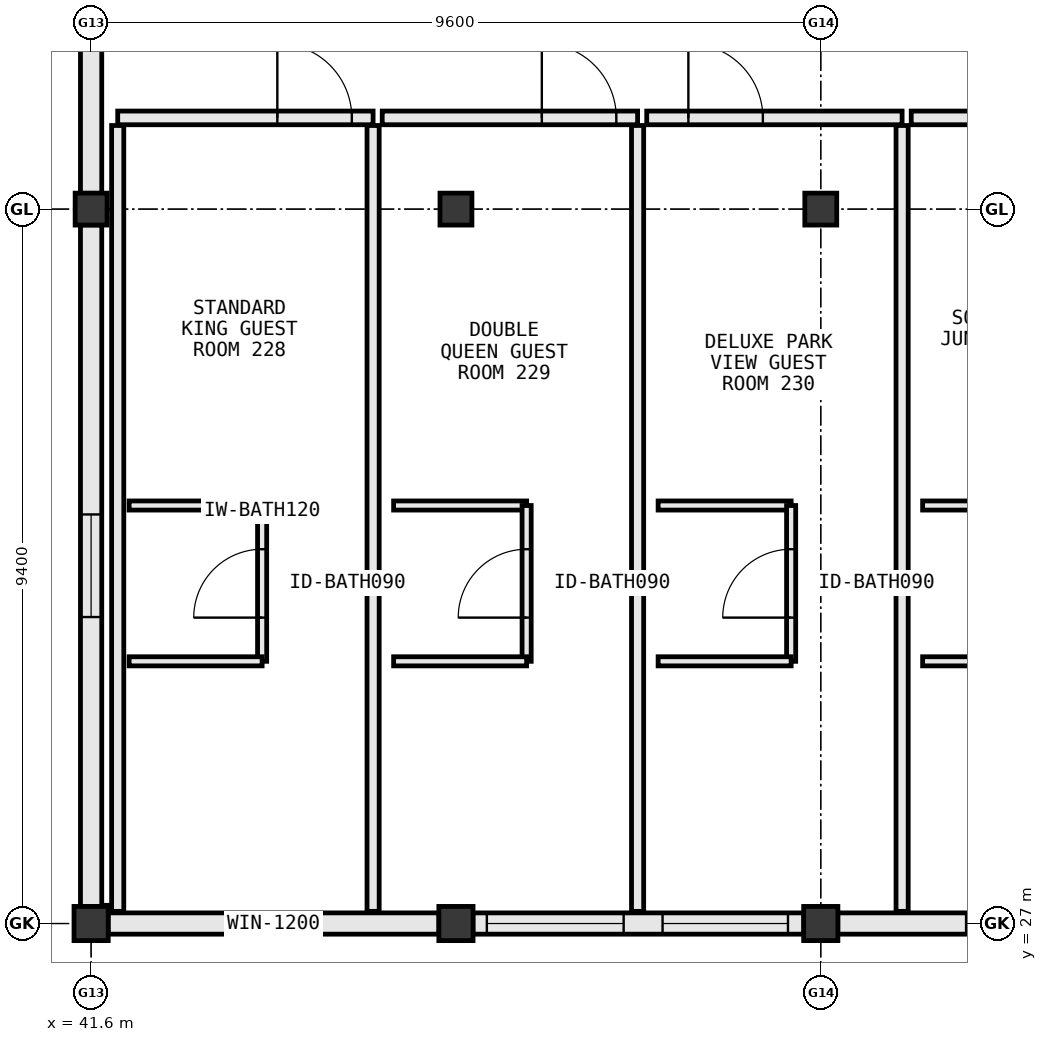
"""IFC4 building model, lengths in metres.
Left out: names, types, materials, properties, quantities, classifications, styles, units other than length and angle.
Written with IfcOpenShell. Run it as: python <this file> out.ifc"""

import sys

from ifc_helpers import new_model, si_unit, direction, frame, frame_2d, origin, origin_2d, place, context, subcontext, project, spatial, rectangle, extrude, element, fill, save


model = new_model("IFC4")
c1 = context("Model", 3, precision=1e-05, world=origin(), true_north=direction((0.0, 1.0)))
c2 = subcontext(c1, "Body", "Model", "MODEL_VIEW")
j1 = project(units=[si_unit("LENGTHUNIT", "METRE"), si_unit("PLANEANGLEUNIT", "RADIAN")], contexts=[c1])
p1 = place(None, origin())
s1 = spatial("IfcSite", under=j1, at=p1, CompositionType="ELEMENT")
p2 = place(p1, origin())
s2 = spatial("IfcBuilding", under=s1, at=p2, CompositionType="ELEMENT")
p3 = place(p2, frame((0.0, 0.0, 31.4)))
s3 = spatial("IfcBuildingStorey", under=s2, at=p3, CompositionType="ELEMENT", Elevation=31.4)
p4 = place(p3, frame((41.6, 27.0, 0.0), z_axis=(0.0, 0.0, 1.0), x_axis=(1.0, 0.0, 0.0)))
e1 = element("IfcColumn", 1, at=p4, inside=s3, PredefinedType="COLUMN", context=c2, shape_type="SweptSolid", body=[
    extrude(rectangle(XDim=0.45, YDim=0.45, at=origin_2d()), origin(), (0.0, 0.0, 1.0), 3.8),
])
p5 = place(p3, frame((41.6, 36.4, 0.0), z_axis=(0.0, 0.0, 1.0), x_axis=(1.0, 0.0, 0.0)))
e2 = element("IfcColumn", 2, at=p5, inside=s3, PredefinedType="COLUMN", context=c2, shape_type="SweptSolid", body=[
    extrude(rectangle(XDim=0.42, YDim=0.42, at=origin_2d()), origin(), (0.0, 0.0, 1.0), 3.8),
])
p6 = place(p3, frame((46.4, 27.0, 0.0), z_axis=(0.0, 0.0, 1.0), x_axis=(1.0, 0.0, 0.0)))
e3 = element("IfcColumn", 3, at=p6, inside=s3, PredefinedType="COLUMN", context=c2, shape_type="SweptSolid", body=[
    extrude(rectangle(XDim=0.45, YDim=0.45, at=origin_2d()), origin(), (0.0, 0.0, 1.0), 3.8),
])
p7 = place(p3, frame((46.4, 36.4, 0.0), z_axis=(0.0, 0.0, 1.0), x_axis=(1.0, 0.0, 0.0)))
e4 = element("IfcColumn", 4, at=p7, inside=s3, PredefinedType="COLUMN", context=c2, shape_type="SweptSolid", body=[
    extrude(rectangle(XDim=0.42, YDim=0.42, at=origin_2d()), origin(), (0.0, 0.0, 1.0), 3.8),
])
p8 = place(p3, frame((51.2, 27.0, 0.0), z_axis=(0.0, 0.0, 1.0), x_axis=(1.0, 0.0, 0.0)))
e5 = element("IfcColumn", 5, at=p8, inside=s3, PredefinedType="COLUMN", context=c2, shape_type="SweptSolid", body=[
    extrude(rectangle(XDim=0.45, YDim=0.45, at=origin_2d()), origin(), (0.0, 0.0, 1.0), 3.8),
])
p9 = place(p3, frame((51.2, 36.4, 0.0), z_axis=(0.0, 0.0, 1.0), x_axis=(1.0, 0.0, 0.0)))
e6 = element("IfcColumn", 6, at=p9, inside=s3, PredefinedType="COLUMN", context=c2, shape_type="SweptSolid", body=[
    extrude(rectangle(XDim=0.42, YDim=0.42, at=origin_2d()), origin(), (0.0, 0.0, 1.0), 3.8),
])
p10 = place(p3, frame((41.6, 46.992, 0.0), z_axis=(0.0, 0.0, 1.0), x_axis=(0.0, -1.0, 0.0)))
e7 = element("IfcWall", 7, at=p10, inside=s3, PredefinedType="STANDARD", context=c2, shape_type="SweptSolid", body=[
    extrude(rectangle(XDim=10.384, YDim=0.28, at=frame_2d((5.192, 0.0))), origin(), (0.0, 0.0, 1.0), 2.91),
])
p11 = place(p10, frame((1.921, 0.0, 0.85)))
e8 = element("IfcOpeningElement", 8, at=p11, cuts=e7, PredefinedType="OPENING", context=c2, shape_type="SweptSolid", body=[
    extrude(rectangle(XDim=1.35, YDim=1.65, at=frame_2d((0.675, 0.825))), frame((0.0, 0.152, 0.0), z_axis=(0.0, -1.0, 0.0), x_axis=(1.0, 0.0, 0.0)), (0.0, 0.0, 1.0), 0.304),
])
p12 = place(p10, frame((7.113, 0.0, 0.85)))
e9 = element("IfcOpeningElement", 9, at=p12, cuts=e7, PredefinedType="OPENING", context=c2, shape_type="SweptSolid", body=[
    extrude(rectangle(XDim=1.35, YDim=1.65, at=frame_2d((0.675, 0.825))), frame((0.0, 0.152, 0.0), z_axis=(0.0, -1.0, 0.0), x_axis=(1.0, 0.0, 0.0)), (0.0, 0.0, 1.0), 0.304),
])
p13 = place(p3, frame((41.6, 36.192, 0.0), z_axis=(0.0, 0.0, 1.0), x_axis=(0.0, -1.0, 0.0)))
e10 = element("IfcWall", 10, at=p13, inside=s3, PredefinedType="STANDARD", context=c2, shape_type="SweptSolid", body=[
    extrude(rectangle(XDim=8.969, YDim=0.28, at=frame_2d((4.484, 0.0))), origin(), (0.0, 0.0, 1.0), 2.93),
])
p14 = place(p13, frame((3.81, 0.0, 0.85)))
e11 = element("IfcOpeningElement", 11, at=p14, cuts=e10, PredefinedType="OPENING", context=c2, shape_type="SweptSolid", body=[
    extrude(rectangle(XDim=1.35, YDim=1.65, at=frame_2d((0.675, 0.825))), frame((0.0, 0.152, 0.0), z_axis=(0.0, -1.0, 0.0), x_axis=(1.0, 0.0, 0.0)), (0.0, 0.0, 1.0), 0.304),
])
p15 = place(p3, frame((41.823, 27.0, 0.0), z_axis=(0.0, 0.0, 1.0), x_axis=(1.0, 0.0, 0.0)))
e12 = element("IfcWall", 12, at=p15, inside=s3, PredefinedType="STANDARD", context=c2, shape_type="SweptSolid", body=[
    extrude(rectangle(XDim=4.354, YDim=0.28, at=frame_2d((2.177, 0.0))), origin(), (0.0, 0.0, 1.0), 3.01),
])
p16 = place(p15, frame((1.577, 0.0, 0.85)))
e13 = element("IfcOpeningElement", 13, at=p16, cuts=e12, PredefinedType="OPENING", context=c2, shape_type="SweptSolid", body=[
    extrude(rectangle(XDim=1.2, YDim=1.55, at=frame_2d((0.6, 0.775))), frame((0.0, 0.152, 0.0), z_axis=(0.0, -1.0, 0.0), x_axis=(1.0, 0.0, 0.0)), (0.0, 0.0, 1.0), 0.304),
])
p17 = place(p3, frame((46.623, 27.0, 0.0), z_axis=(0.0, 0.0, 1.0), x_axis=(1.0, 0.0, 0.0)))
e14 = element("IfcWall", 14, at=p17, inside=s3, PredefinedType="STANDARD", context=c2, shape_type="SweptSolid", body=[
    extrude(rectangle(XDim=4.354, YDim=0.28, at=frame_2d((2.177, 0.0))), origin(), (0.0, 0.0, 1.0), 3.01),
])
p18 = place(p17, frame((0.184, 0.0, 0.85)))
e15 = element("IfcOpeningElement", 15, at=p18, cuts=e14, PredefinedType="OPENING", context=c2, shape_type="SweptSolid", body=[
    extrude(rectangle(XDim=1.8, YDim=1.85, at=frame_2d((0.9, 0.925))), frame((0.0, 0.152, 0.0), z_axis=(0.0, -1.0, 0.0), x_axis=(1.0, 0.0, 0.0)), (0.0, 0.0, 1.0), 0.304),
])
p19 = place(p17, frame((2.496, 0.0, 0.85)))
e16 = element("IfcOpeningElement", 16, at=p19, cuts=e14, PredefinedType="OPENING", context=c2, shape_type="SweptSolid", body=[
    extrude(rectangle(XDim=1.65, YDim=1.8, at=frame_2d((0.825, 0.9))), frame((0.0, 0.152, 0.0), z_axis=(0.0, -1.0, 0.0), x_axis=(1.0, 0.0, 0.0)), (0.0, 0.0, 1.0), 0.304),
])
p20 = place(p3, frame((51.423, 27.0, 0.0), z_axis=(0.0, 0.0, 1.0), x_axis=(1.0, 0.0, 0.0)))
e17 = element("IfcWall", 17, at=p20, inside=s3, PredefinedType="STANDARD", context=c2, shape_type="SweptSolid", body=[
    extrude(rectangle(XDim=9.154, YDim=0.28, at=frame_2d((4.577, 0.0))), origin(), (0.0, 0.0, 1.0), 2.83),
])
p21 = place(p20, frame((1.688, 0.0, 0.85)))
e18 = element("IfcOpeningElement", 18, at=p21, cuts=e17, PredefinedType="OPENING", context=c2, shape_type="SweptSolid", body=[
    extrude(rectangle(XDim=1.2, YDim=1.55, at=frame_2d((0.6, 0.775))), frame((0.0, 0.152, 0.0), z_axis=(0.0, -1.0, 0.0), x_axis=(1.0, 0.0, 0.0)), (0.0, 0.0, 1.0), 0.304),
])
p22 = place(p20, frame((6.265, 0.0, 0.85)))
e19 = element("IfcOpeningElement", 19, at=p22, cuts=e17, PredefinedType="OPENING", context=c2, shape_type="SweptSolid", body=[
    extrude(rectangle(XDim=1.2, YDim=1.55, at=frame_2d((0.6, 0.775))), frame((0.0, 0.152, 0.0), z_axis=(0.0, -1.0, 0.0), x_axis=(1.0, 0.0, 0.0)), (0.0, 0.0, 1.0), 0.304),
])
p23 = place(p3, frame((45.31, 37.6, 0.0), z_axis=(0.0, 0.0, 1.0), x_axis=(-1.0, 0.0, 0.0)))
e20 = element("IfcWall", 20, at=p23, inside=s3, PredefinedType="PARTITIONING", context=c2, shape_type="SweptSolid", body=[
    extrude(rectangle(XDim=3.36, YDim=0.18, at=frame_2d((1.68, 0.0))), origin(), (0.0, 0.0, 1.0), 3.555),
])
p24 = place(p23, frame((0.28, 0.0, 0.0)))
e21 = element("IfcOpeningElement", 21, at=p24, cuts=e20, PredefinedType="OPENING", context=c2, shape_type="SweptSolid", body=[
    extrude(rectangle(XDim=0.98, YDim=2.18, at=frame_2d((0.49, 1.09))), frame((0.0, 0.102, 0.0), z_axis=(0.0, -1.0, 0.0), x_axis=(1.0, 0.0, 0.0)), (0.0, 0.0, 1.0), 0.204),
])
p25 = place(p3, frame((41.95, 27.16, 0.0), z_axis=(0.0, 0.0, 1.0), x_axis=(0.0, 1.0, 0.0)))
e22 = element("IfcWall", 22, at=p25, inside=s3, PredefinedType="PARTITIONING", context=c2, shape_type="SweptSolid", body=[
    extrude(rectangle(XDim=10.34, YDim=0.16, at=frame_2d((5.17, 0.0))), origin(), (0.0, 0.0, 1.0), 2.91),
])
p26 = place(p3, frame((45.31, 27.16, 0.0), z_axis=(0.0, 0.0, 1.0), x_axis=(0.0, 1.0, 0.0)))
e23 = element("IfcWall", 23, at=p26, inside=s3, PredefinedType="PARTITIONING", context=c2, shape_type="SweptSolid", body=[
    extrude(rectangle(XDim=10.34, YDim=0.16, at=frame_2d((5.17, 0.0))), origin(), (0.0, 0.0, 1.0), 3.555),
])
p27 = place(p3, frame((42.1, 32.5, 0.0), z_axis=(0.0, 0.0, 1.0), x_axis=(1.0, 0.0, 0.0)))
e24 = element("IfcWall", 24, at=p27, inside=s3, PredefinedType="PARTITIONING", context=c2, shape_type="SweptSolid", body=[
    extrude(rectangle(XDim=1.75, YDim=0.12, at=frame_2d((0.875, 0.0))), origin(), (0.0, 0.0, 1.0), 3.555),
])
p28 = place(p3, frame((43.85, 30.45, 0.0), z_axis=(0.0, 0.0, 1.0), x_axis=(0.0, 1.0, 0.0)))
e25 = element("IfcWall", 25, at=p28, inside=s3, PredefinedType="PARTITIONING", context=c2, shape_type="SweptSolid", body=[
    extrude(rectangle(XDim=2.05, YDim=0.12, at=frame_2d((1.025, 0.0))), origin(), (0.0, 0.0, 1.0), 3.1),
])
p29 = place(p28, frame((0.575, 0.0, 0.0)))
e26 = element("IfcOpeningElement", 26, at=p29, cuts=e25, PredefinedType="OPENING", context=c2, shape_type="SweptSolid", body=[
    extrude(rectangle(XDim=0.9, YDim=2.15, at=frame_2d((0.45, 1.075))), frame((0.0, 0.072, 0.0), z_axis=(0.0, -1.0, 0.0), x_axis=(1.0, 0.0, 0.0)), (0.0, 0.0, 1.0), 0.144),
])
p30 = place(p3, frame((42.1, 30.45, 0.0), z_axis=(0.0, 0.0, 1.0), x_axis=(1.0, 0.0, 0.0)))
e27 = element("IfcWall", 27, at=p30, inside=s3, PredefinedType="PARTITIONING", context=c2, shape_type="SweptSolid", body=[
    extrude(rectangle(XDim=1.75, YDim=0.12, at=frame_2d((0.875, 0.0))), origin(), (0.0, 0.0, 1.0), 3.555),
])
p31 = place(p3, frame((48.79, 37.6, 0.0), z_axis=(0.0, 0.0, 1.0), x_axis=(-1.0, 0.0, 0.0)))
e28 = element("IfcWall", 28, at=p31, inside=s3, PredefinedType="PARTITIONING", context=c2, shape_type="SweptSolid", body=[
    extrude(rectangle(XDim=3.36, YDim=0.18, at=frame_2d((1.68, 0.0))), origin(), (0.0, 0.0, 1.0), 3.555),
])
p32 = place(p31, frame((0.28, 0.0, 0.0)))
e29 = element("IfcOpeningElement", 29, at=p32, cuts=e28, PredefinedType="OPENING", context=c2, shape_type="SweptSolid", body=[
    extrude(rectangle(XDim=0.98, YDim=2.18, at=frame_2d((0.49, 1.09))), frame((0.0, 0.102, 0.0), z_axis=(0.0, -1.0, 0.0), x_axis=(1.0, 0.0, 0.0)), (0.0, 0.0, 1.0), 0.204),
])
p33 = place(p3, frame((48.79, 27.16, 0.0), z_axis=(0.0, 0.0, 1.0), x_axis=(0.0, 1.0, 0.0)))
e30 = element("IfcWall", 30, at=p33, inside=s3, PredefinedType="PARTITIONING", context=c2, shape_type="SweptSolid", body=[
    extrude(rectangle(XDim=10.34, YDim=0.16, at=frame_2d((5.17, 0.0))), origin(), (0.0, 0.0, 1.0), 3.1),
])
p34 = place(p3, frame((45.58, 32.5, 0.0), z_axis=(0.0, 0.0, 1.0), x_axis=(1.0, 0.0, 0.0)))
e31 = element("IfcWall", 31, at=p34, inside=s3, PredefinedType="PARTITIONING", context=c2, shape_type="SweptSolid", body=[
    extrude(rectangle(XDim=1.75, YDim=0.12, at=frame_2d((0.875, 0.0))), origin(), (0.0, 0.0, 1.0), 3.555),
])
p35 = place(p3, frame((47.33, 30.45, 0.0), z_axis=(0.0, 0.0, 1.0), x_axis=(0.0, 1.0, 0.0)))
e32 = element("IfcWall", 32, at=p35, inside=s3, PredefinedType="PARTITIONING", context=c2, shape_type="SweptSolid", body=[
    extrude(rectangle(XDim=2.05, YDim=0.12, at=frame_2d((1.025, 0.0))), origin(), (0.0, 0.0, 1.0), 3.555),
])
p36 = place(p35, frame((0.575, 0.0, 0.0)))
e33 = element("IfcOpeningElement", 33, at=p36, cuts=e32, PredefinedType="OPENING", context=c2, shape_type="SweptSolid", body=[
    extrude(rectangle(XDim=0.9, YDim=2.15, at=frame_2d((0.45, 1.075))), frame((0.0, 0.072, 0.0), z_axis=(0.0, -1.0, 0.0), x_axis=(1.0, 0.0, 0.0)), (0.0, 0.0, 1.0), 0.144),
])
p37 = place(p3, frame((45.58, 30.45, 0.0), z_axis=(0.0, 0.0, 1.0), x_axis=(1.0, 0.0, 0.0)))
e34 = element("IfcWall", 34, at=p37, inside=s3, PredefinedType="PARTITIONING", context=c2, shape_type="SweptSolid", body=[
    extrude(rectangle(XDim=1.75, YDim=0.12, at=frame_2d((0.875, 0.0))), origin(), (0.0, 0.0, 1.0), 3.555),
])
p38 = place(p3, frame((52.27, 37.6, 0.0), z_axis=(0.0, 0.0, 1.0), x_axis=(-1.0, 0.0, 0.0)))
e35 = element("IfcWall", 35, at=p38, inside=s3, PredefinedType="PARTITIONING", context=c2, shape_type="SweptSolid", body=[
    extrude(rectangle(XDim=3.36, YDim=0.18, at=frame_2d((1.68, 0.0))), origin(), (0.0, 0.0, 1.0), 3.555),
])
p39 = place(p38, frame((1.832, 0.0, 0.0)))
e36 = element("IfcOpeningElement", 36, at=p39, cuts=e35, PredefinedType="OPENING", context=c2, shape_type="SweptSolid", body=[
    extrude(rectangle(XDim=0.98, YDim=2.18, at=frame_2d((0.49, 1.09))), frame((0.0, 0.102, 0.0), z_axis=(0.0, -1.0, 0.0), x_axis=(1.0, 0.0, 0.0)), (0.0, 0.0, 1.0), 0.204),
])
p40 = place(p3, frame((52.27, 27.16, 0.0), z_axis=(0.0, 0.0, 1.0), x_axis=(0.0, 1.0, 0.0)))
e37 = element("IfcWall", 37, at=p40, inside=s3, PredefinedType="PARTITIONING", context=c2, shape_type="SweptSolid", body=[
    extrude(rectangle(XDim=10.34, YDim=0.16, at=frame_2d((5.17, 0.0))), origin(), (0.0, 0.0, 1.0), 3.555),
])
p41 = place(p3, frame((49.06, 32.5, 0.0), z_axis=(0.0, 0.0, 1.0), x_axis=(1.0, 0.0, 0.0)))
e38 = element("IfcWall", 38, at=p41, inside=s3, PredefinedType="PARTITIONING", context=c2, shape_type="SweptSolid", body=[
    extrude(rectangle(XDim=1.75, YDim=0.12, at=frame_2d((0.875, 0.0))), origin(), (0.0, 0.0, 1.0), 3.555),
])
p42 = place(p3, frame((50.81, 30.45, 0.0), z_axis=(0.0, 0.0, 1.0), x_axis=(0.0, 1.0, 0.0)))
e39 = element("IfcWall", 39, at=p42, inside=s3, PredefinedType="PARTITIONING", context=c2, shape_type="SweptSolid", body=[
    extrude(rectangle(XDim=2.05, YDim=0.12, at=frame_2d((1.025, 0.0))), origin(), (0.0, 0.0, 1.0), 2.93),
])
p43 = place(p42, frame((0.575, 0.0, 0.0)))
e40 = element("IfcOpeningElement", 40, at=p43, cuts=e39, PredefinedType="OPENING", context=c2, shape_type="SweptSolid", body=[
    extrude(rectangle(XDim=0.9, YDim=2.15, at=frame_2d((0.45, 1.075))), frame((0.0, 0.072, 0.0), z_axis=(0.0, -1.0, 0.0), x_axis=(1.0, 0.0, 0.0)), (0.0, 0.0, 1.0), 0.144),
])
p44 = place(p3, frame((49.06, 30.45, 0.0), z_axis=(0.0, 0.0, 1.0), x_axis=(1.0, 0.0, 0.0)))
e41 = element("IfcWall", 41, at=p44, inside=s3, PredefinedType="PARTITIONING", context=c2, shape_type="SweptSolid", body=[
    extrude(rectangle(XDim=1.75, YDim=0.12, at=frame_2d((0.875, 0.0))), origin(), (0.0, 0.0, 1.0), 3.555),
])
p45 = place(p3, frame((55.75, 37.6, 0.0), z_axis=(0.0, 0.0, 1.0), x_axis=(-1.0, 0.0, 0.0)))
e42 = element("IfcWall", 42, at=p45, inside=s3, PredefinedType="PARTITIONING", context=c2, shape_type="SweptSolid", body=[
    extrude(rectangle(XDim=3.36, YDim=0.18, at=frame_2d((1.68, 0.0))), origin(), (0.0, 0.0, 1.0), 3.555),
])
p46 = place(p45, frame((0.28, 0.0, 0.0)))
e43 = element("IfcOpeningElement", 43, at=p46, cuts=e42, PredefinedType="OPENING", context=c2, shape_type="SweptSolid", body=[
    extrude(rectangle(XDim=0.98, YDim=2.18, at=frame_2d((0.49, 1.09))), frame((0.0, 0.102, 0.0), z_axis=(0.0, -1.0, 0.0), x_axis=(1.0, 0.0, 0.0)), (0.0, 0.0, 1.0), 0.204),
])
for number, where, z_axis, x_axis in (
    (44, (52.54, 32.5, 0.0), (0.0, 0.0, 1.0), (1.0, 0.0, 0.0)),
    (45, (52.54, 30.45, 0.0), (0.0, 0.0, 1.0), (1.0, 0.0, 0.0)),
):
    element("IfcWall", number, at=place(p3, frame(where, z_axis=z_axis, x_axis=x_axis)), inside=s3, PredefinedType="PARTITIONING", context=c2, shape_type="SweptSolid", body=[
        extrude(rectangle(XDim=1.75, YDim=0.12, at=frame_2d((0.875, 0.0))), origin(), (0.0, 0.0, 1.0), 3.555),
    ])
p47 = place(p14, origin())
e46 = element("IfcWindow", 46, at=p47, inside=s3, PartitioningType="SINGLE_PANEL", PredefinedType="WINDOW", context=c2, shape_type="SweptSolid", body=[
    extrude(rectangle(XDim=1.35, YDim=1.65, at=frame_2d((0.675, 0.825))), frame((0.0, 0.03, 0.0), z_axis=(0.0, -1.0, 0.0), x_axis=(1.0, 0.0, 0.0)), (0.0, 0.0, 1.0), 0.06),
])
fill(e11, e46)
p48 = place(p16, origin())
e47 = element("IfcWindow", 47, at=p48, inside=s3, PartitioningType="SINGLE_PANEL", PredefinedType="WINDOW", context=c2, shape_type="SweptSolid", body=[
    extrude(rectangle(XDim=1.2, YDim=1.55, at=frame_2d((0.6, 0.775))), frame((0.0, 0.03, 0.0), z_axis=(0.0, -1.0, 0.0), x_axis=(1.0, 0.0, 0.0)), (0.0, 0.0, 1.0), 0.06),
])
fill(e13, e47)
p49 = place(p21, origin())
e48 = element("IfcWindow", 48, at=p49, inside=s3, PartitioningType="SINGLE_PANEL", PredefinedType="WINDOW", context=c2, shape_type="SweptSolid", body=[
    extrude(rectangle(XDim=1.2, YDim=1.55, at=frame_2d((0.6, 0.775))), frame((0.0, 0.03, 0.0), z_axis=(0.0, -1.0, 0.0), x_axis=(1.0, 0.0, 0.0)), (0.0, 0.0, 1.0), 0.06),
])
fill(e18, e48)
p50 = place(p18, origin())
e49 = element("IfcWindow", 49, at=p50, inside=s3, PartitioningType="SINGLE_PANEL", PredefinedType="WINDOW", context=c2, shape_type="SweptSolid", body=[
    extrude(rectangle(XDim=1.8, YDim=1.85, at=frame_2d((0.9, 0.925))), frame((0.0, 0.03, 0.0), z_axis=(0.0, -1.0, 0.0), x_axis=(1.0, 0.0, 0.0)), (0.0, 0.0, 1.0), 0.06),
])
fill(e15, e49)
p51 = place(p19, origin())
e50 = element("IfcWindow", 50, at=p51, inside=s3, PartitioningType="SINGLE_PANEL", PredefinedType="WINDOW", context=c2, shape_type="SweptSolid", body=[
    extrude(rectangle(XDim=1.65, YDim=1.8, at=frame_2d((0.825, 0.9))), frame((0.0, 0.03, 0.0), z_axis=(0.0, -1.0, 0.0), x_axis=(1.0, 0.0, 0.0)), (0.0, 0.0, 1.0), 0.06),
])
fill(e16, e50)
p52 = place(p24, frame((0.98, 0.0, 0.0), z_axis=(0.0, 0.0, 1.0), x_axis=(-1.0, 0.0, 0.0)))
e51 = element("IfcDoor", 51, at=p52, inside=s3, OperationType="SINGLE_SWING_RIGHT", PredefinedType="DOOR", context=c2, shape_type="SweptSolid", body=[
    extrude(rectangle(XDim=0.98, YDim=2.18, at=frame_2d((0.49, 1.09))), frame((0.0, 0.025, 0.0), z_axis=(0.0, -1.0, 0.0), x_axis=(1.0, 0.0, 0.0)), (0.0, 0.0, 1.0), 0.05),
])
fill(e21, e51)
p53 = place(p29, origin())
e52 = element("IfcDoor", 52, at=p53, inside=s3, OperationType="SINGLE_SWING_LEFT", PredefinedType="DOOR", context=c2, shape_type="SweptSolid", body=[
    extrude(rectangle(XDim=0.9, YDim=2.15, at=frame_2d((0.45, 1.075))), frame((0.0, 0.025, 0.0), z_axis=(0.0, -1.0, 0.0), x_axis=(1.0, 0.0, 0.0)), (0.0, 0.0, 1.0), 0.05),
])
fill(e26, e52)
p54 = place(p32, frame((0.98, 0.0, 0.0), z_axis=(0.0, 0.0, 1.0), x_axis=(-1.0, 0.0, 0.0)))
e53 = element("IfcDoor", 53, at=p54, inside=s3, OperationType="SINGLE_SWING_RIGHT", PredefinedType="DOOR", context=c2, shape_type="SweptSolid", body=[
    extrude(rectangle(XDim=0.98, YDim=2.18, at=frame_2d((0.49, 1.09))), frame((0.0, 0.025, 0.0), z_axis=(0.0, -1.0, 0.0), x_axis=(1.0, 0.0, 0.0)), (0.0, 0.0, 1.0), 0.05),
])
fill(e29, e53)
p55 = place(p36, origin())
e54 = element("IfcDoor", 54, at=p55, inside=s3, OperationType="SINGLE_SWING_LEFT", PredefinedType="DOOR", context=c2, shape_type="SweptSolid", body=[
    extrude(rectangle(XDim=0.9, YDim=2.15, at=frame_2d((0.45, 1.075))), frame((0.0, 0.025, 0.0), z_axis=(0.0, -1.0, 0.0), x_axis=(1.0, 0.0, 0.0)), (0.0, 0.0, 1.0), 0.05),
])
fill(e33, e54)
p56 = place(p39, frame((0.98, 0.0, 0.0), z_axis=(0.0, 0.0, 1.0), x_axis=(-1.0, 0.0, 0.0)))
e55 = element("IfcDoor", 55, at=p56, inside=s3, OperationType="SINGLE_SWING_RIGHT", PredefinedType="DOOR", context=c2, shape_type="SweptSolid", body=[
    extrude(rectangle(XDim=0.98, YDim=2.18, at=frame_2d((0.49, 1.09))), frame((0.0, 0.025, 0.0), z_axis=(0.0, -1.0, 0.0), x_axis=(1.0, 0.0, 0.0)), (0.0, 0.0, 1.0), 0.05),
])
fill(e36, e55)
p57 = place(p43, origin())
e56 = element("IfcDoor", 56, at=p57, inside=s3, OperationType="SINGLE_SWING_LEFT", PredefinedType="DOOR", context=c2, shape_type="SweptSolid", body=[
    extrude(rectangle(XDim=0.9, YDim=2.15, at=frame_2d((0.45, 1.075))), frame((0.0, 0.025, 0.0), z_axis=(0.0, -1.0, 0.0), x_axis=(1.0, 0.0, 0.0)), (0.0, 0.0, 1.0), 0.05),
])
fill(e40, e56)
save(model, sys.argv[1])
